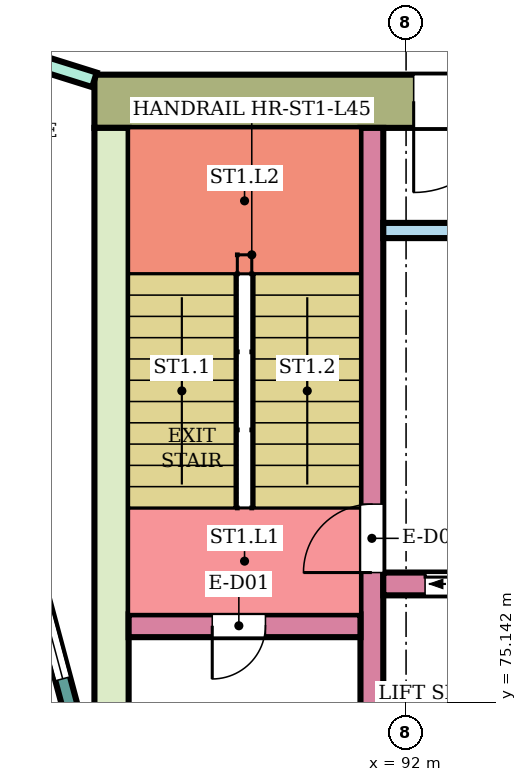
"""IFC4 building model, lengths in metres.
Left out: names, types, materials, properties, quantities, classifications, styles, units other than length and angle.
Written with IfcOpenShell. Run it as: python <this file> out.ifc"""

import sys

from ifc_helpers import new_model, si_unit, direction, frame, frame_2d, origin, place, context, subcontext, project, spatial, rectangle, extrude, element, fill, save


model = new_model("IFC4")
c1 = context("Model", 3, precision=1e-05, world=origin(), true_north=direction((0.0, 1.0)))
c2 = subcontext(c1, "Body", "Model", "MODEL_VIEW")
j1 = project(units=[si_unit("LENGTHUNIT", "METRE"), si_unit("PLANEANGLEUNIT", "RADIAN")], contexts=[c1])
p1 = place(None, origin())
s1 = spatial("IfcSite", under=j1, at=p1, CompositionType="ELEMENT")
p2 = place(p1, origin())
s2 = spatial("IfcBuilding", under=s1, at=p2, CompositionType="ELEMENT")
p3 = place(p2, frame((0.0, 0.0, 194.6)))
s3 = spatial("IfcBuildingStorey", under=s2, at=p3, CompositionType="ELEMENT", Elevation=194.6)
p4 = place(p3, frame((87.9, 83.05, 0.0), z_axis=(0.0, 0.0, 1.0), x_axis=(1.0, 0.0, 0.0)))
e1 = element("IfcWall", 1, at=p4, inside=s3, PredefinedType="SHEAR", context=c2, shape_type="SweptSolid", body=[
    extrude(rectangle(XDim=14.8, YDim=0.7, at=frame_2d((7.4, 0.0))), origin(), (0.0, 0.0, 1.0), 3.78),
])
p5 = place(p4, frame((4.2, 0.0, 0.0)))
e2 = element("IfcOpeningElement", 2, at=p5, cuts=e1, PredefinedType="OPENING", context=c2, shape_type="SweptSolid", body=[
    extrude(rectangle(XDim=2.4, YDim=2.4, at=frame_2d((1.2, 1.2))), frame((0.0, 0.36, 0.0), z_axis=(0.0, -1.0, 0.0), x_axis=(1.0, 0.0, 0.0)), (0.0, 0.0, 1.0), 0.72),
])
p6 = place(p3, frame((88.125, 75.0, 0.0), z_axis=(0.0, 0.0, 1.0), x_axis=(0.0, 1.0, 0.0)))
e3 = element("IfcWall", 3, at=p6, inside=s3, PredefinedType="SHEAR", context=c2, shape_type="SweptSolid", body=[
    extrude(rectangle(XDim=7.7, YDim=0.45, at=frame_2d((3.85, 0.0))), origin(), (0.0, 0.0, 1.0), 3.78),
])
p7 = place(p3, frame((91.55, 75.0, 0.0), z_axis=(0.0, 0.0, 1.0), x_axis=(0.0, 1.0, 0.0)))
e4 = element("IfcWall", 4, at=p7, inside=s3, PredefinedType="SHEAR", context=c2, shape_type="SweptSolid", body=[
    extrude(rectangle(XDim=7.7, YDim=0.3, at=frame_2d((3.85, 0.0))), origin(), (0.0, 0.0, 1.0), 3.78),
])
p8 = place(p7, frame((1.85, 0.0, 0.0)))
e5 = element("IfcOpeningElement", 5, at=p8, cuts=e4, PredefinedType="OPENING", context=c2, shape_type="SweptSolid", body=[
    extrude(rectangle(XDim=0.9, YDim=2.1, at=frame_2d((0.45, 1.05))), frame((0.0, 0.16, 0.0), z_axis=(0.0, -1.0, 0.0), x_axis=(1.0, 0.0, 0.0)), (0.0, 0.0, 1.0), 0.32),
])
p9 = place(p3, frame((88.35, 76.15, 0.0), z_axis=(0.0, 0.0, 1.0), x_axis=(1.0, 0.0, 0.0)))
e6 = element("IfcWall", 6, at=p9, inside=s3, PredefinedType="SHEAR", context=c2, shape_type="SweptSolid", body=[
    extrude(rectangle(XDim=3.05, YDim=0.3, at=frame_2d((1.525, 0.0))), origin(), (0.0, 0.0, 1.0), 3.78),
])
p10 = place(p9, frame((1.1, 0.0, 0.0)))
e7 = element("IfcOpeningElement", 7, at=p10, cuts=e6, PredefinedType="OPENING", context=c2, shape_type="SweptSolid", body=[
    extrude(rectangle(XDim=0.7, YDim=2.0, at=frame_2d((0.35, 1.0))), frame((0.0, 0.16, 0.0), z_axis=(0.0, -1.0, 0.0), x_axis=(1.0, 0.0, 0.0)), (0.0, 0.0, 1.0), 0.32),
])
p11 = place(p3, frame((91.7, 76.7, 0.0), z_axis=(0.0, 0.0, 1.0), x_axis=(1.0, 0.0, 0.0)))
e8 = element("IfcWall", 8, at=p11, inside=s3, PredefinedType="SHEAR", context=c2, shape_type="SweptSolid", body=[
    extrude(rectangle(XDim=11.0, YDim=0.3, at=frame_2d((5.5, 0.0))), origin(), (0.0, 0.0, 1.0), 3.78),
])
p12 = place(p11, frame((0.55, 0.0, 0.0)))
e9 = element("IfcOpeningElement", 9, at=p12, cuts=e8, PredefinedType="OPENING", context=c2, shape_type="SweptSolid", body=[
    extrude(rectangle(XDim=1.1, YDim=2.1, at=frame_2d((0.55, 1.05))), frame((0.0, 0.16, 0.0), z_axis=(0.0, -1.0, 0.0), x_axis=(1.0, 0.0, 0.0)), (0.0, 0.0, 1.0), 0.32),
])
p13 = place(p11, frame((3.0, 0.0, 0.0)))
e10 = element("IfcOpeningElement", 10, at=p13, cuts=e8, PredefinedType="OPENING", context=c2, shape_type="SweptSolid", body=[
    extrude(rectangle(XDim=1.2, YDim=2.1, at=frame_2d((0.6, 1.05))), frame((0.0, 0.16, 0.0), z_axis=(0.0, -1.0, 0.0), x_axis=(1.0, 0.0, 0.0)), (0.0, 0.0, 1.0), 0.32),
])
p14 = place(p11, frame((5.5, 0.0, 0.0)))
e11 = element("IfcOpeningElement", 11, at=p14, cuts=e8, PredefinedType="OPENING", context=c2, shape_type="SweptSolid", body=[
    extrude(rectangle(XDim=1.2, YDim=2.1, at=frame_2d((0.6, 1.05))), frame((0.0, 0.16, 0.0), z_axis=(0.0, -1.0, 0.0), x_axis=(1.0, 0.0, 0.0)), (0.0, 0.0, 1.0), 0.32),
])
p15 = place(p11, frame((8.8, 0.0, 0.0)))
e12 = element("IfcOpeningElement", 12, at=p15, cuts=e8, PredefinedType="OPENING", context=c2, shape_type="SweptSolid", body=[
    extrude(rectangle(XDim=0.9, YDim=2.1, at=frame_2d((0.45, 1.05))), frame((0.0, 0.16, 0.0), z_axis=(0.0, -1.0, 0.0), x_axis=(1.0, 0.0, 0.0)), (0.0, 0.0, 1.0), 0.32),
])
p16 = place(p3, frame((91.7, 81.35, 0.0), z_axis=(0.0, 0.0, 1.0), x_axis=(1.0, 0.0, 0.0)))
e13 = element("IfcWall", 13, at=p16, inside=s3, PredefinedType="SHEAR", context=c2, shape_type="SweptSolid", body=[
    extrude(rectangle(XDim=4.5, YDim=0.2, at=frame_2d((2.25, 0.0))), origin(), (0.0, 0.0, 1.0), 3.78),
])
p17 = place(p3, frame((87.604, 75.0, 0.0), z_axis=(0.0, 0.0, 1.0), x_axis=(-0.258789828301, 0.965933654434, 0.0)))
e14 = element("IfcWall", 14, at=p17, inside=s3, PredefinedType="NOTDEFINED", context=c2, shape_type="SweptSolid", body=[
    extrude(rectangle(XDim=3.936, YDim=0.2, at=frame_2d((1.968, 0.0))), origin(), (0.0, 0.0, 1.0), 4.1),
])
p18 = place(p17, frame((0.468, 0.0, 0.9)))
e15 = element("IfcOpeningElement", 15, at=p18, cuts=e14, PredefinedType="OPENING", context=c2, shape_type="SweptSolid", body=[
    extrude(rectangle(XDim=3.0, YDim=2.3, at=frame_2d((1.5, 1.15))), frame((0.0, 0.11, 0.0), z_axis=(0.0, -1.0, 0.0), x_axis=(1.0, 0.0, 0.0)), (0.0, 0.0, 1.0), 0.22),
])
p19 = place(p3, frame((85.587, 84.057, 0.0), z_axis=(0.0, 0.0, 1.0), x_axis=(0.954210767728, -0.299135104513, 0.0)))
e16 = element("IfcWall", 16, at=p19, inside=s3, PredefinedType="PARTITIONING", context=c2, shape_type="SweptSolid", body=[
    extrude(rectangle(XDim=2.424, YDim=0.2, at=frame_2d((1.212, 0.0))), origin(), (0.0, 0.0, 1.0), 3.65),
])
p20 = place(p18, origin())
e17 = element("IfcWindow", 17, at=p20, inside=s3, PartitioningType="SINGLE_PANEL", PredefinedType="WINDOW", context=c2, shape_type="SweptSolid", body=[
    extrude(rectangle(XDim=3.0, YDim=2.3, at=frame_2d((1.5, 1.15))), frame((0.0, 0.03, 0.0), z_axis=(0.0, -1.0, 0.0), x_axis=(1.0, 0.0, 0.0)), (0.0, 0.0, 1.0), 0.06),
])
fill(e15, e17)
p21 = place(p10, frame((0.7, 0.0, 0.0), z_axis=(0.0, 0.0, 1.0), x_axis=(-1.0, 0.0, 0.0)))
e18 = element("IfcDoor", 18, at=p21, inside=s3, OperationType="SINGLE_SWING_RIGHT", PredefinedType="DOOR", context=c2, shape_type="SweptSolid", body=[
    extrude(rectangle(XDim=0.7, YDim=2.0, at=frame_2d((0.35, 1.0))), frame((0.0, 0.025, 0.0), z_axis=(0.0, -1.0, 0.0), x_axis=(1.0, 0.0, 0.0)), (0.0, 0.0, 1.0), 0.05),
])
fill(e7, e18)
p22 = place(p8, origin())
e19 = element("IfcDoor", 19, at=p22, inside=s3, OperationType="SINGLE_SWING_LEFT", PredefinedType="DOOR", context=c2, shape_type="SweptSolid", body=[
    extrude(rectangle(XDim=0.9, YDim=2.1, at=frame_2d((0.45, 1.05))), frame((0.0, 0.025, 0.0), z_axis=(0.0, -1.0, 0.0), x_axis=(1.0, 0.0, 0.0)), (0.0, 0.0, 1.0), 0.05),
])
fill(e5, e19)
p23 = place(p12, origin())
e20 = element("IfcDoor", 20, at=p23, inside=s3, OperationType="DOUBLE_DOOR_SLIDING", PredefinedType="DOOR", context=c2, shape_type="SweptSolid", body=[
    extrude(rectangle(XDim=1.1, YDim=2.1, at=frame_2d((0.55, 1.05))), frame((0.0, 0.025, 0.0), z_axis=(0.0, -1.0, 0.0), x_axis=(1.0, 0.0, 0.0)), (0.0, 0.0, 1.0), 0.05),
])
fill(e9, e20)
p24 = place(p5, frame((2.4, 0.0, 0.0), z_axis=(0.0, 0.0, 1.0), x_axis=(-1.0, 0.0, 0.0)))
e21 = element("IfcDoor", 21, at=p24, inside=s3, OperationType="DOUBLE_DOOR_SINGLE_SWING", PredefinedType="DOOR", context=c2, shape_type="SweptSolid", body=[
    extrude(rectangle(XDim=2.4, YDim=2.4, at=frame_2d((1.2, 1.2))), frame((0.0, 0.025, 0.0), z_axis=(0.0, -1.0, 0.0), x_axis=(1.0, 0.0, 0.0)), (0.0, 0.0, 1.0), 0.05),
])
fill(e2, e21)
save(model, sys.argv[1])
